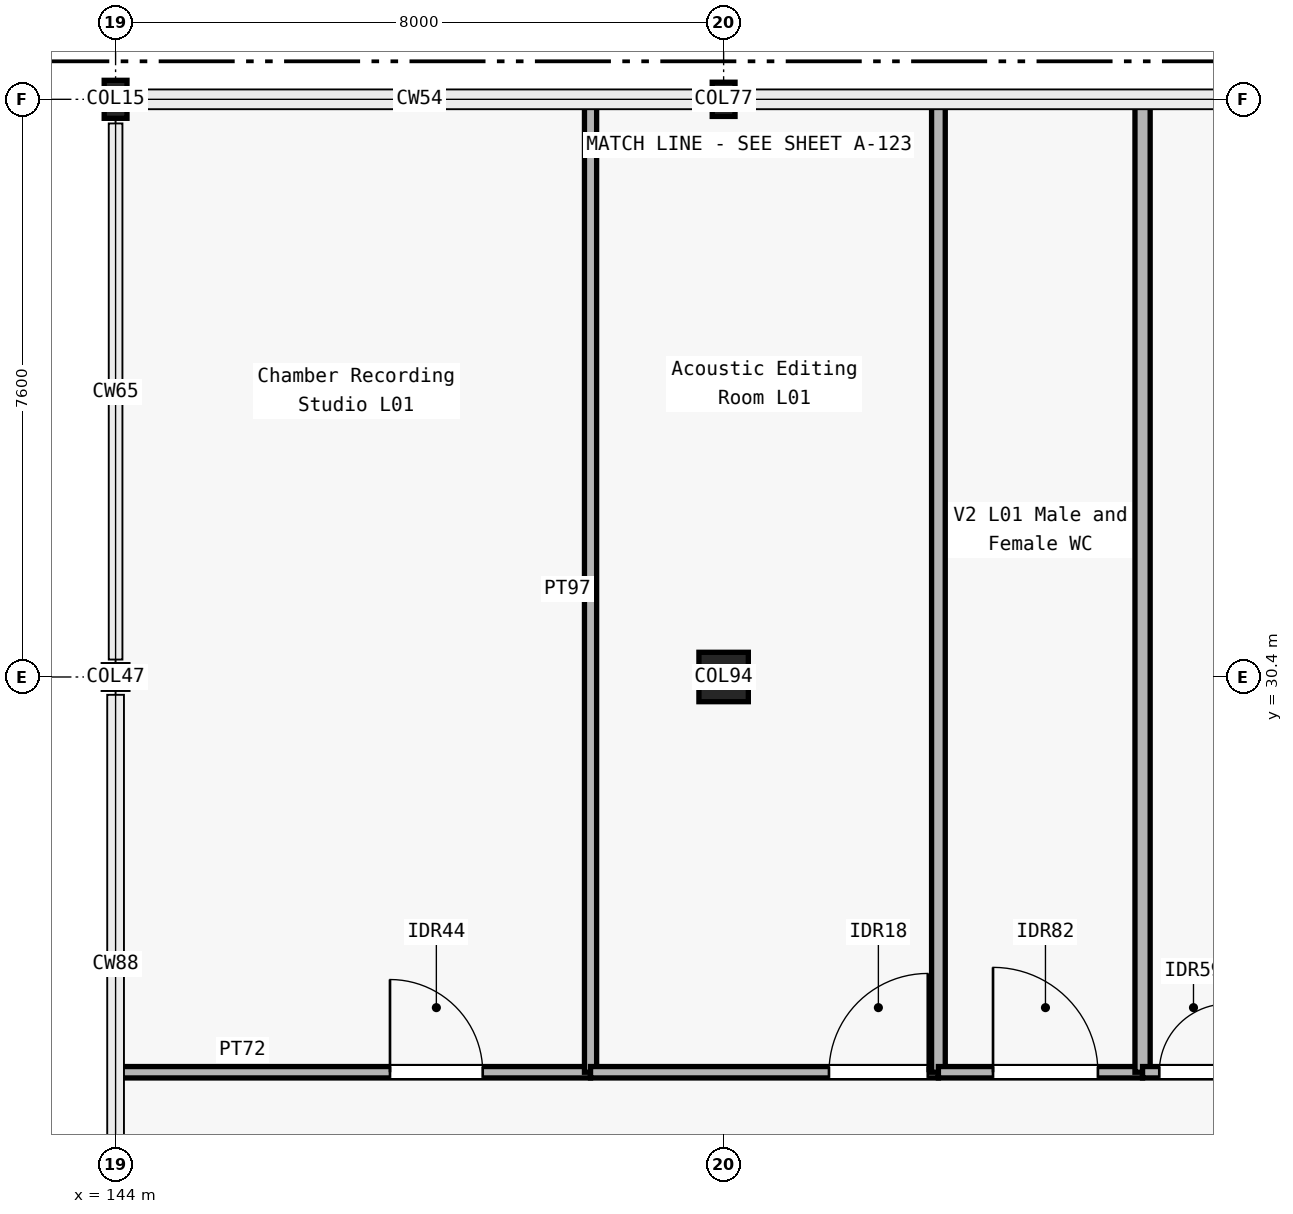
"""IFC4 building model, lengths in metres.
Left out: names, types, materials, properties, quantities, classifications, styles, units other than length and angle.
Written with IfcOpenShell. Run it as: python <this file> out.ifc"""

import sys

from ifc_helpers import new_model, si_unit, direction, frame, frame_2d, origin, origin_2d, place, context, subcontext, project, spatial, rectangle, circle, hollow_circle, i_section, extrude, element, fill, save


model = new_model("IFC4")
c1 = context("Model", 3, precision=1e-05, world=origin(), true_north=direction((0.0, 1.0)))
c2 = subcontext(c1, "Body", "Model", "MODEL_VIEW")
j1 = project(units=[si_unit("LENGTHUNIT", "METRE"), si_unit("PLANEANGLEUNIT", "RADIAN")], contexts=[c1])
p1 = place(None, origin())
s1 = spatial("IfcSite", under=j1, at=p1, CompositionType="ELEMENT")
p2 = place(p1, origin())
s2 = spatial("IfcBuilding", under=s1, at=p2, CompositionType="ELEMENT")
p3 = place(p2, frame((0.0, 0.0, 5.4)))
s3 = spatial("IfcBuildingStorey", under=s2, at=p3, CompositionType="ELEMENT", Elevation=5.4)
p4 = place(p3, frame((144.0, 30.4, 0.0), z_axis=(0.0, 0.0, 1.0), x_axis=(1.0, 0.0, 0.0)))
e1 = element("IfcColumn", 1, at=p4, inside=s3, PredefinedType="COLUMN", context=c2, shape_type="SweptSolid", body=[
    extrude(hollow_circle(Radius=0.162, WallThickness=0.016, at=origin_2d()), origin(), (0.0, 0.0, 1.0), 4.8),
])
p5 = place(p3, frame((144.0, 38.0, 0.0), z_axis=(0.0, 0.0, 1.0), x_axis=(1.0, 0.0, 0.0)))
e2 = element("IfcColumn", 2, at=p5, inside=s3, PredefinedType="COLUMN", context=c2, shape_type="SweptSolid", body=[
    extrude(i_section(OverallWidth=0.3, OverallDepth=0.5, WebThickness=0.014, FlangeThickness=0.028, FilletRadius=0.027, at=origin_2d()), origin(), (0.0, 0.0, 1.0), 4.8),
])
p6 = place(p3, frame((152.0, 30.4, 0.0), z_axis=(0.0, 0.0, 1.0), x_axis=(1.0, 0.0, 0.0)))
e3 = element("IfcColumn", 3, at=p6, inside=s3, PredefinedType="COLUMN", context=c2, shape_type="SweptSolid", body=[
    extrude(circle(Radius=0.325, at=origin_2d()), origin(), (0.0, 0.0, 1.0), 4.8),
])
p7 = place(p3, frame((152.0, 38.0, 0.0), z_axis=(0.0, 0.0, 1.0), x_axis=(1.0, 0.0, 0.0)))
e4 = element("IfcColumn", 4, at=p7, inside=s3, PredefinedType="COLUMN", context=c2, shape_type="SweptSolid", body=[
    extrude(i_section(OverallWidth=0.3, OverallDepth=0.45, WebThickness=0.014, FlangeThickness=0.026, FilletRadius=0.027, at=origin_2d()), origin(), (0.0, 0.0, 1.0), 4.8),
])
p8 = place(p3, frame((144.08, 25.2, 0.0), z_axis=(0.0, 0.0, 1.0), x_axis=(1.0, 0.0, 0.0)))
e5 = element("IfcWall", 5, at=p8, inside=s3, PredefinedType="PARTITIONING", context=c2, shape_type="SweptSolid", body=[
    extrude(rectangle(XDim=6.169, YDim=0.15, at=frame_2d((3.084, 0.0))), origin(), (0.0, 0.0, 1.0), 3.905),
])
p9 = place(p8, frame((3.53, 0.0, 0.0)))
e6 = element("IfcOpeningElement", 6, at=p9, cuts=e5, PredefinedType="OPENING", context=c2, shape_type="SweptSolid", body=[
    extrude(rectangle(XDim=1.22, YDim=2.15, at=frame_2d((0.61, 1.075))), frame((0.0, 0.085, 0.0), z_axis=(0.0, -1.0, 0.0), x_axis=(1.0, 0.0, 0.0)), (0.0, 0.0, 1.0), 0.17),
])
p10 = place(p3, frame((150.249, 25.2, 0.0), z_axis=(0.0, 0.0, 1.0), x_axis=(0.0, 1.0, 0.0)))
e7 = element("IfcWall", 7, at=p10, inside=s3, PredefinedType="PARTITIONING", context=c2, shape_type="SweptSolid", body=[
    extrude(rectangle(XDim=12.72, YDim=0.16, at=frame_2d((6.36, 0.0))), origin(), (0.0, 0.0, 1.0), 3.585),
])
p11 = place(p3, frame((150.249, 25.2, 0.0), z_axis=(0.0, 0.0, 1.0), x_axis=(1.0, 0.0, 0.0)))
e8 = element("IfcWall", 8, at=p11, inside=s3, PredefinedType="PARTITIONING", context=c2, shape_type="SweptSolid", body=[
    extrude(rectangle(XDim=4.577, YDim=0.15, at=frame_2d((2.289, 0.0))), origin(), (0.0, 0.0, 1.0), 3.735),
])
p12 = place(p11, frame((3.137, 0.0, 0.0)))
e9 = element("IfcOpeningElement", 9, at=p12, cuts=e8, PredefinedType="OPENING", context=c2, shape_type="SweptSolid", body=[
    extrude(rectangle(XDim=1.3, YDim=2.2, at=frame_2d((0.65, 1.1))), frame((0.0, 0.085, 0.0), z_axis=(0.0, -1.0, 0.0), x_axis=(1.0, 0.0, 0.0)), (0.0, 0.0, 1.0), 0.17),
])
p13 = place(p3, frame((154.826, 25.2, 0.0), z_axis=(0.0, 0.0, 1.0), x_axis=(0.0, 1.0, 0.0)))
e10 = element("IfcWall", 10, at=p13, inside=s3, PredefinedType="PARTITIONING", context=c2, shape_type="SweptSolid", body=[
    extrude(rectangle(XDim=12.72, YDim=0.18, at=frame_2d((6.36, 0.0))), origin(), (0.0, 0.0, 1.0), 3.76),
])
p14 = place(p3, frame((154.826, 25.2, 0.0), z_axis=(0.0, 0.0, 1.0), x_axis=(1.0, 0.0, 0.0)))
e11 = element("IfcWall", 11, at=p14, inside=s3, PredefinedType="PARTITIONING", context=c2, shape_type="SweptSolid", body=[
    extrude(rectangle(XDim=2.686, YDim=0.15, at=frame_2d((1.343, 0.0))), origin(), (0.0, 0.0, 1.0), 3.895),
])
p15 = place(p14, frame((0.719, 0.0, 0.0)))
e12 = element("IfcOpeningElement", 12, at=p15, cuts=e11, PredefinedType="OPENING", context=c2, shape_type="SweptSolid", body=[
    extrude(rectangle(XDim=1.38, YDim=2.2, at=frame_2d((0.69, 1.1))), frame((0.0, 0.085, 0.0), z_axis=(0.0, -1.0, 0.0), x_axis=(1.0, 0.0, 0.0)), (0.0, 0.0, 1.0), 0.17),
])
p16 = place(p3, frame((157.512, 25.2, 0.0), z_axis=(0.0, 0.0, 1.0), x_axis=(0.0, 1.0, 0.0)))
e13 = element("IfcWall", 13, at=p16, inside=s3, PredefinedType="PARTITIONING", context=c2, shape_type="SweptSolid", body=[
    extrude(rectangle(XDim=12.72, YDim=0.2, at=frame_2d((6.36, 0.0))), origin(), (0.0, 0.0, 1.0), 3.76),
])
p17 = place(p3, frame((157.512, 25.2, 0.0), z_axis=(0.0, 0.0, 1.0), x_axis=(1.0, 0.0, 0.0)))
e14 = element("IfcWall", 14, at=p17, inside=s3, PredefinedType="PARTITIONING", context=c2, shape_type="SweptSolid", body=[
    extrude(rectangle(XDim=2.488, YDim=0.15, at=frame_2d((1.244, 0.0))), origin(), (0.0, 0.0, 1.0), 3.685),
])
p18 = place(p17, frame((0.22, 0.0, 0.0)))
e15 = element("IfcOpeningElement", 15, at=p18, cuts=e14, PredefinedType="OPENING", context=c2, shape_type="SweptSolid", body=[
    extrude(rectangle(XDim=0.9, YDim=2.05, at=frame_2d((0.45, 1.025))), frame((0.0, 0.085, 0.0), z_axis=(0.0, -1.0, 0.0), x_axis=(1.0, 0.0, 0.0)), (0.0, 0.0, 1.0), 0.17),
])
p19 = place(p9, origin())
e16 = element("IfcDoor", 16, at=p19, inside=s3, OperationType="SINGLE_SWING_LEFT", PredefinedType="DOOR", context=c2, shape_type="SweptSolid", body=[
    extrude(rectangle(XDim=1.22, YDim=2.15, at=frame_2d((0.61, 1.075))), frame((0.0, 0.025, 0.0), z_axis=(0.0, -1.0, 0.0), x_axis=(1.0, 0.0, 0.0)), (0.0, 0.0, 1.0), 0.05),
])
fill(e6, e16)
p20 = place(p12, origin())
e17 = element("IfcDoor", 17, at=p20, inside=s3, OperationType="SINGLE_SWING_RIGHT", PredefinedType="DOOR", context=c2, shape_type="SweptSolid", body=[
    extrude(rectangle(XDim=1.3, YDim=2.2, at=frame_2d((0.65, 1.1))), frame((0.0, 0.025, 0.0), z_axis=(0.0, -1.0, 0.0), x_axis=(1.0, 0.0, 0.0)), (0.0, 0.0, 1.0), 0.05),
])
fill(e9, e17)
p21 = place(p15, origin())
e18 = element("IfcDoor", 18, at=p21, inside=s3, OperationType="SINGLE_SWING_LEFT", PredefinedType="DOOR", context=c2, shape_type="SweptSolid", body=[
    extrude(rectangle(XDim=1.38, YDim=2.2, at=frame_2d((0.69, 1.1))), frame((0.0, 0.025, 0.0), z_axis=(0.0, -1.0, 0.0), x_axis=(1.0, 0.0, 0.0)), (0.0, 0.0, 1.0), 0.05),
])
fill(e12, e18)
p22 = place(p18, origin())
e19 = element("IfcDoor", 19, at=p22, inside=s3, OperationType="SINGLE_SWING_RIGHT", PredefinedType="DOOR", context=c2, shape_type="SweptSolid", body=[
    extrude(rectangle(XDim=0.9, YDim=2.05, at=frame_2d((0.45, 1.025))), frame((0.0, 0.025, 0.0), z_axis=(0.0, -1.0, 0.0), x_axis=(1.0, 0.0, 0.0)), (0.0, 0.0, 1.0), 0.05),
])
fill(e15, e19)
save(model, sys.argv[1])
